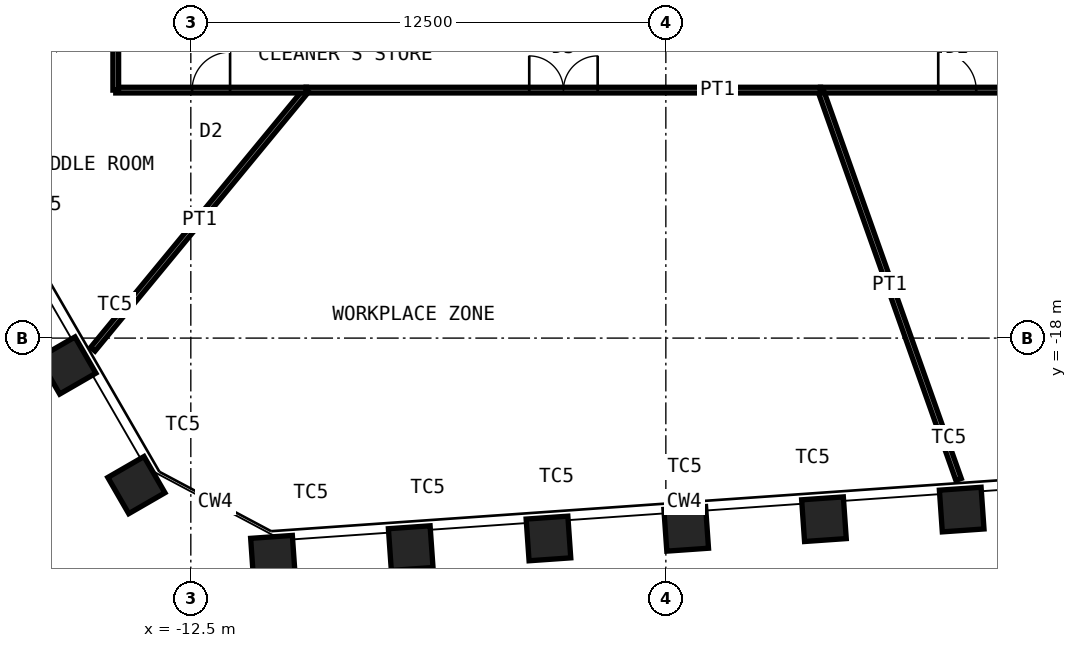
"""IFC4 building model, lengths in metres.
Left out: names, types, materials, properties, quantities, classifications, styles, units other than length and angle.
Written with IfcOpenShell. Run it as: python <this file> out.ifc"""

import sys

from ifc_helpers import new_model, si_unit, direction, frame, frame_2d, origin, origin_2d, place, context, subcontext, project, spatial, rectangle, hollow_rectangle, extrude, element, fill, save


model = new_model("IFC4")
c1 = context("Model", 3, precision=1e-05, world=origin(), true_north=direction((0.0, 1.0)))
c2 = subcontext(c1, "Body", "Model", "MODEL_VIEW")
j1 = project(units=[si_unit("LENGTHUNIT", "METRE"), si_unit("PLANEANGLEUNIT", "RADIAN")], contexts=[c1])
p1 = place(None, origin())
s1 = spatial("IfcSite", under=j1, at=p1, CompositionType="ELEMENT")
p2 = place(p1, origin())
s2 = spatial("IfcBuilding", under=s1, at=p2, CompositionType="ELEMENT")
p3 = place(p2, frame((0.0, 0.0, 188.8)))
s3 = spatial("IfcBuildingStorey", under=s2, at=p3, CompositionType="ELEMENT", Elevation=188.8)
for number, where, z_axis, x_axis in (
    (1, (7.785, -22.512, 0.0), (0.0, 0.0, 1.0), (0.998, 0.07, 0.0)),
    (2, (4.16, -22.765, 0.0), (0.0, 0.0, 1.0), (0.998, 0.07, 0.0)),
    (3, (0.536, -23.019, 0.0), (0.0, 0.0, 1.0), (0.998, 0.07, 0.0)),
    (4, (-3.089, -23.272, 0.0), (0.0, 0.0, 1.0), (0.998, 0.07, 0.0)),
    (5, (-6.714, -23.526, 0.0), (0.0, 0.0, 1.0), (0.998, 0.07, 0.0)),
    (6, (-10.338, -23.779, 0.0), (0.0, 0.0, 1.0), (0.998, 0.07, 0.0)),
    (7, (-13.933, -21.868, 0.0), (0.0, 0.0, 1.0), (0.5, -0.866, 0.0)),
    (8, (-15.749, -18.721, 0.0), (0.0, 0.0, 1.0), (0.5, -0.866, 0.0)),
):
    element("IfcColumn", number, at=place(p3, frame(where, z_axis=z_axis, x_axis=x_axis)), inside=s3, PredefinedType="COLUMN", context=c2, shape_type="SweptSolid", body=[
        extrude(hollow_rectangle(XDim=1.1, YDim=1.1, WallThickness=0.07, at=origin_2d()), origin(), (0.0, 0.0, 1.0), 4.2),
    ])
p4 = place(p3, frame((11.266, -11.475, 0.0), z_axis=(0.0, 0.0, 1.0), x_axis=(-1.0, 0.0, 0.0)))
e9 = element("IfcWall", 9, at=p4, inside=s3, PredefinedType="PARTITIONING", context=c2, shape_type="SweptSolid", body=[
    extrude(rectangle(XDim=7.196, YDim=0.15, at=frame_2d((3.598, 0.0))), origin(), (0.0, 0.0, 1.0), 4.03),
])
p5 = place(p4, frame((3.098, 0.0, 0.0)))
e10 = element("IfcOpeningElement", 10, at=p5, cuts=e9, PredefinedType="OPENING", context=c2, shape_type="SweptSolid", body=[
    extrude(rectangle(XDim=1.0, YDim=2.4, at=frame_2d((0.5, 1.2))), frame((0.0, 0.085, 0.0), z_axis=(0.0, -1.0, 0.0), x_axis=(1.0, 0.0, 0.0)), (0.0, 0.0, 1.0), 0.17),
])
p6 = place(p3, frame((7.703, -21.719, 0.0), z_axis=(0.0, 0.0, 1.0), x_axis=(-0.334269551553, 0.942477515331, 0.0)))
e11 = element("IfcWall", 11, at=p6, inside=s3, PredefinedType="PARTITIONING", context=c2, shape_type="SweptSolid", body=[
    extrude(rectangle(XDim=10.869, YDim=0.15, at=frame_2d((5.435, 0.0))), origin(), (0.0, 0.0, 1.0), 3.43),
])
p7 = place(p3, frame((4.07, -11.475, 0.0), z_axis=(0.0, 0.0, 1.0), x_axis=(-1.0, 0.0, 0.0)))
e12 = element("IfcWall", 12, at=p7, inside=s3, PredefinedType="PARTITIONING", context=c2, shape_type="SweptSolid", body=[
    extrude(rectangle(XDim=13.528, YDim=0.15, at=frame_2d((6.764, 0.0))), origin(), (0.0, 0.0, 1.0), 4.03),
])
p8 = place(p7, frame((5.864, 0.0, 0.0)))
e13 = element("IfcOpeningElement", 13, at=p8, cuts=e12, PredefinedType="OPENING", context=c2, shape_type="SweptSolid", body=[
    extrude(rectangle(XDim=1.8, YDim=2.4, at=frame_2d((0.9, 1.2))), frame((0.0, 0.085, 0.0), z_axis=(0.0, -1.0, 0.0), x_axis=(1.0, 0.0, 0.0)), (0.0, 0.0, 1.0), 0.17),
])
p9 = place(p3, frame((-15.08, -18.294, 0.0), z_axis=(0.0, 0.0, 1.0), x_axis=(0.636052894953, 0.771645459277, 0.0)))
e14 = element("IfcWall", 14, at=p9, inside=s3, PredefinedType="PARTITIONING", context=c2, shape_type="SweptSolid", body=[
    extrude(rectangle(XDim=8.837, YDim=0.15, at=frame_2d((4.418, 0.0))), origin(), (0.0, 0.0, 1.0), 3.43),
])
p10 = place(p3, frame((-9.459, -11.475, 0.0), z_axis=(0.0, 0.0, 1.0), x_axis=(-1.0, 0.0, 0.0)))
e15 = element("IfcWall", 15, at=p10, inside=s3, PredefinedType="PARTITIONING", context=c2, shape_type="SweptSolid", body=[
    extrude(rectangle(XDim=5.016, YDim=0.15, at=frame_2d((2.508, 0.0))), origin(), (0.0, 0.0, 1.0), 4.03),
])
p11 = place(p10, frame((2.008, 0.0, 0.0)))
e16 = element("IfcOpeningElement", 16, at=p11, cuts=e15, PredefinedType="OPENING", context=c2, shape_type="SweptSolid", body=[
    extrude(rectangle(XDim=1.0, YDim=2.4, at=frame_2d((0.5, 1.2))), frame((0.0, 0.085, 0.0), z_axis=(0.0, -1.0, 0.0), x_axis=(1.0, 0.0, 0.0)), (0.0, 0.0, 1.0), 0.17),
])
p12 = place(p3, frame((-14.475, -11.475, 0.0), z_axis=(0.0, 0.0, 1.0), x_axis=(0.0, 1.0, 0.0)))
e17 = element("IfcWall", 17, at=p12, inside=s3, PredefinedType="PARTITIONING", context=c2, shape_type="SweptSolid", body=[
    extrude(rectangle(XDim=2.164, YDim=0.15, at=frame_2d((1.082, 0.0))), origin(), (0.0, 0.0, 1.0), 4.03),
])
p13 = place(p3, frame((-18.693, -12.024, 0.0), z_axis=(0.0, 0.0, 1.0), x_axis=(0.841031335058, 0.540986407824, 0.0)))
e18 = element("IfcWall", 18, at=p13, inside=s3, PredefinedType="PARTITIONING", context=c2, shape_type="SweptSolid", body=[
    extrude(rectangle(XDim=5.015, YDim=0.15, at=frame_2d((2.507, 0.0))), origin(), (0.0, 0.0, 1.0), 3.43),
])
p14 = place(p5, origin())
e19 = element("IfcDoor", 19, at=p14, inside=s3, OperationType="SINGLE_SWING_RIGHT", PredefinedType="DOOR", context=c2, shape_type="SweptSolid", body=[
    extrude(rectangle(XDim=1.0, YDim=2.4, at=frame_2d((0.5, 1.2))), frame((0.0, 0.025, 0.0), z_axis=(0.0, -1.0, 0.0), x_axis=(1.0, 0.0, 0.0)), (0.0, 0.0, 1.0), 0.05),
])
fill(e10, e19)
p15 = place(p8, origin())
e20 = element("IfcDoor", 20, at=p15, inside=s3, OperationType="DOUBLE_DOOR_DOUBLE_SWING", PredefinedType="DOOR", context=c2, shape_type="SweptSolid", body=[
    extrude(rectangle(XDim=1.8, YDim=2.4, at=frame_2d((0.9, 1.2))), frame((0.0, 0.025, 0.0), z_axis=(0.0, -1.0, 0.0), x_axis=(1.0, 0.0, 0.0)), (0.0, 0.0, 1.0), 0.05),
])
fill(e13, e20)
p16 = place(p11, origin())
e21 = element("IfcDoor", 21, at=p16, inside=s3, OperationType="SINGLE_SWING_LEFT", PredefinedType="DOOR", context=c2, shape_type="SweptSolid", body=[
    extrude(rectangle(XDim=1.0, YDim=2.4, at=frame_2d((0.5, 1.2))), frame((0.0, 0.025, 0.0), z_axis=(0.0, -1.0, 0.0), x_axis=(1.0, 0.0, 0.0)), (0.0, 0.0, 1.0), 0.05),
])
fill(e16, e21)
save(model, sys.argv[1])
